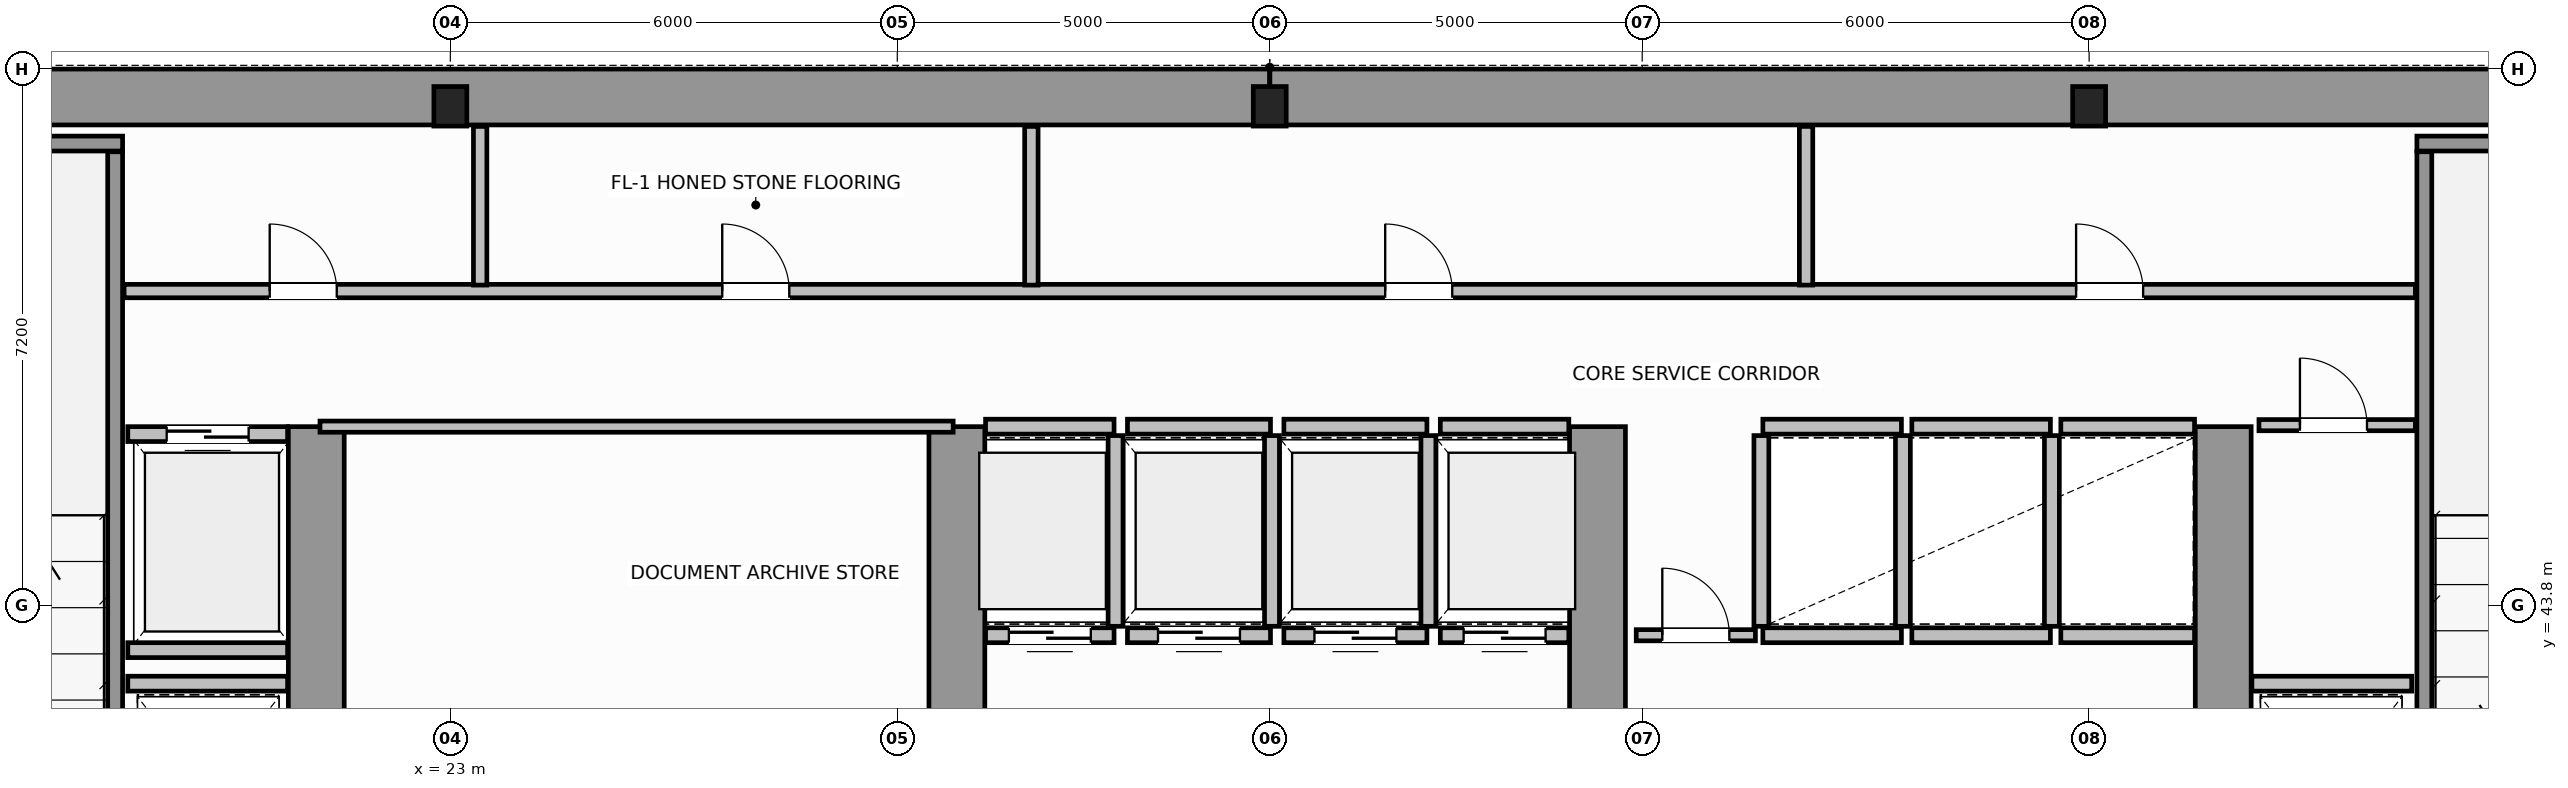
"""IFC4 building model, lengths in metres.
Left out: names, types, materials, properties, quantities, classifications, styles, units other than length and angle.
Written with IfcOpenShell. Run it as: python <this file> out.ifc"""

import sys

from ifc_helpers import new_model, si_unit, direction, frame, frame_2d, origin, origin_2d, place, context, subcontext, project, spatial, rectangle, i_section, extrude, source, transform, mapped, element, fill, save


model = new_model("IFC4")
c1 = context("Model", 3, precision=1e-05, world=origin(), true_north=direction((0.0, 1.0)))
c2 = subcontext(c1, "Body", "Model", "MODEL_VIEW")
j1 = project(units=[si_unit("LENGTHUNIT", "METRE"), si_unit("PLANEANGLEUNIT", "RADIAN")], contexts=[c1])
p1 = place(None, origin())
s1 = spatial("IfcSite", under=j1, at=p1, CompositionType="ELEMENT")
p2 = place(p1, origin())
s2 = spatial("IfcBuilding", under=s1, at=p2, CompositionType="ELEMENT")
p3 = place(p2, frame((0.0, 0.0, 114.8)))
s3 = spatial("IfcBuildingStorey", under=s2, at=p3, CompositionType="ELEMENT", Elevation=114.8)
m1 = source(origin(), c2, "Body", "SweptSolid", [
    extrude(i_section(OverallWidth=0.442, OverallDepth=0.531, WebThickness=0.065, FlangeThickness=0.076, FilletRadius=0.015, at=origin_2d()), origin(), (0.0, 0.0, 1.0), 3.8),
])
for number, where, z_axis, x_axis in (
    (1, (23.0, 50.5, 0.0), (0.0, 0.0, 1.0), (1.0, 0.0, 0.0)),
    (2, (34.0, 50.5, 0.0), (0.0, 0.0, 1.0), (1.0, 0.0, 0.0)),
    (3, (45.0, 50.5, 0.0), (0.0, 0.0, 1.0), (1.0, 0.0, 0.0)),
):
    element("IfcColumn", number, at=place(p3, frame(where, z_axis=z_axis, x_axis=x_axis)), inside=s3, PredefinedType="COLUMN", context=c2, shape_type="MappedRepresentation", body=[
        mapped(m1, transform((0.0, 0.0, 0.0), scale=1.0)),
    ])
for number, where, z_axis, x_axis in (
    (4, (14.379, 50.625, 0.0), (0.0, 0.0, 1.0), (1.0, 0.0, 0.0)),
    (5, (34.002, 50.625, 0.0), (0.0, 0.0, 1.0), (1.0, 0.0, 0.0)),
):
    element("IfcWall", number, at=place(p3, frame(where, z_axis=z_axis, x_axis=x_axis)), inside=s3, PredefinedType="SHEAR", context=c2, shape_type="SweptSolid", body=[
        extrude(rectangle(XDim=19.619, YDim=0.75, at=frame_2d((9.81, 0.0))), origin(), (0.0, 0.0, 1.0), 3.8),
    ])
for number, where, z_axis, x_axis in (
    (6, (21.2, 36.895, 0.0), (0.0, 0.0, 1.0), (0.0, 1.0, 0.0)),
    (7, (29.8, 36.895, 0.0), (0.0, 0.0, 1.0), (0.0, 1.0, 0.0)),
    (8, (38.4, 36.895, 0.0), (0.0, 0.0, 1.0), (0.0, 1.0, 0.0)),
    (9, (46.8, 36.895, 0.0), (0.0, 0.0, 1.0), (0.0, 1.0, 0.0)),
):
    element("IfcWall", number, at=place(p3, frame(where, z_axis=z_axis, x_axis=x_axis)), inside=s3, PredefinedType="SHEAR", context=c2, shape_type="SweptSolid", body=[
        extrude(rectangle(XDim=9.305, YDim=0.75, at=frame_2d((4.652, 0.0))), origin(), (0.0, 0.0, 1.0), 3.8),
    ])
p4 = place(p3, frame((14.375, 50.0, 0.0), z_axis=(0.0, 0.0, 1.0), x_axis=(1.0, 0.0, 0.0)))
e10 = element("IfcWall", 10, at=p4, inside=s3, PredefinedType="SOLIDWALL", context=c2, shape_type="SweptSolid", body=[
    extrude(rectangle(XDim=4.225, YDim=0.2, at=frame_2d((2.113, 0.0))), origin(), (0.0, 0.0, 1.0), 3.8),
])
p5 = place(p3, frame((18.5, 39.96, 0.0), z_axis=(0.0, 0.0, 1.0), x_axis=(0.0, 1.0, 0.0)))
e11 = element("IfcWall", 11, at=p5, inside=s3, PredefinedType="SOLIDWALL", context=c2, shape_type="SweptSolid", body=[
    extrude(rectangle(XDim=9.93, YDim=0.2, at=frame_2d((4.965, 0.0))), origin(), (0.0, 0.0, 1.0), 3.8),
])
p6 = place(p3, frame((49.4, 50.0, 0.0), z_axis=(0.0, 0.0, 1.0), x_axis=(1.0, 0.0, 0.0)))
e12 = element("IfcWall", 12, at=p6, inside=s3, PredefinedType="SOLIDWALL", context=c2, shape_type="SweptSolid", body=[
    extrude(rectangle(XDim=4.225, YDim=0.2, at=frame_2d((2.113, 0.0))), origin(), (0.0, 0.0, 1.0), 3.8),
])
p7 = place(p3, frame((49.5, 39.96, 0.0), z_axis=(0.0, 0.0, 1.0), x_axis=(0.0, 1.0, 0.0)))
e13 = element("IfcWall", 13, at=p7, inside=s3, PredefinedType="SOLIDWALL", context=c2, shape_type="SweptSolid", body=[
    extrude(rectangle(XDim=9.93, YDim=0.2, at=frame_2d((4.965, 0.0))), origin(), (0.0, 0.0, 1.0), 3.8),
])
p8 = place(p3, frame((30.185, 43.4, 0.0), z_axis=(0.0, 0.0, 1.0), x_axis=(1.0, 0.0, 0.0)))
e14 = element("IfcWall", 14, at=p8, inside=s3, PredefinedType="SOLIDWALL", context=c2, shape_type="SweptSolid", body=[
    extrude(rectangle(XDim=1.725, YDim=0.2, at=frame_2d((0.862, 0.0))), origin(), (0.0, 0.0, 1.0), 3.58),
])
p9 = place(p8, frame((0.313, 0.0, 0.0)))
e15 = element("IfcOpeningElement", 15, at=p9, cuts=e14, PredefinedType="OPENING", context=c2, shape_type="SweptSolid", body=[
    extrude(rectangle(XDim=1.1, YDim=2.15, at=frame_2d((0.55, 1.075))), frame((0.0, 0.11, 0.0), z_axis=(0.0, -1.0, 0.0), x_axis=(1.0, 0.0, 0.0)), (0.0, 0.0, 1.0), 0.22),
])
p10 = place(p3, frame((30.185, 46.2, 0.0), z_axis=(0.0, 0.0, 1.0), x_axis=(1.0, 0.0, 0.0)))
e16 = element("IfcWall", 16, at=p10, inside=s3, PredefinedType="SOLIDWALL", context=c2, shape_type="SweptSolid", body=[
    extrude(rectangle(XDim=1.725, YDim=0.2, at=frame_2d((0.862, 0.0))), origin(), (0.0, 0.0, 1.0), 3.58),
])
p11 = place(p3, frame((31.93, 43.52, 0.0), z_axis=(0.0, 0.0, 1.0), x_axis=(0.0, 1.0, 0.0)))
e17 = element("IfcWall", 17, at=p11, inside=s3, PredefinedType="SOLIDWALL", context=c2, shape_type="SweptSolid", body=[
    extrude(rectangle(XDim=2.56, YDim=0.2, at=frame_2d((1.28, 0.0))), origin(), (0.0, 0.0, 1.0), 3.58),
])
p12 = place(p3, frame((32.09, 43.4, 0.0), z_axis=(0.0, 0.0, 1.0), x_axis=(1.0, 0.0, 0.0)))
e18 = element("IfcWall", 18, at=p12, inside=s3, PredefinedType="SOLIDWALL", context=c2, shape_type="SweptSolid", body=[
    extrude(rectangle(XDim=1.92, YDim=0.2, at=frame_2d((0.96, 0.0))), origin(), (0.0, 0.0, 1.0), 3.58),
])
p13 = place(p12, frame((0.41, 0.0, 0.0)))
e19 = element("IfcOpeningElement", 19, at=p13, cuts=e18, PredefinedType="OPENING", context=c2, shape_type="SweptSolid", body=[
    extrude(rectangle(XDim=1.1, YDim=2.15, at=frame_2d((0.55, 1.075))), frame((0.0, 0.11, 0.0), z_axis=(0.0, -1.0, 0.0), x_axis=(1.0, 0.0, 0.0)), (0.0, 0.0, 1.0), 0.22),
])
p14 = place(p3, frame((32.09, 46.2, 0.0), z_axis=(0.0, 0.0, 1.0), x_axis=(1.0, 0.0, 0.0)))
e20 = element("IfcWall", 20, at=p14, inside=s3, PredefinedType="SOLIDWALL", context=c2, shape_type="SweptSolid", body=[
    extrude(rectangle(XDim=1.92, YDim=0.2, at=frame_2d((0.96, 0.0))), origin(), (0.0, 0.0, 1.0), 3.58),
])
p15 = place(p3, frame((34.03, 43.52, 0.0), z_axis=(0.0, 0.0, 1.0), x_axis=(0.0, 1.0, 0.0)))
e21 = element("IfcWall", 21, at=p15, inside=s3, PredefinedType="SOLIDWALL", context=c2, shape_type="SweptSolid", body=[
    extrude(rectangle(XDim=2.56, YDim=0.2, at=frame_2d((1.28, 0.0))), origin(), (0.0, 0.0, 1.0), 3.58),
])
p16 = place(p3, frame((34.19, 43.4, 0.0), z_axis=(0.0, 0.0, 1.0), x_axis=(1.0, 0.0, 0.0)))
e22 = element("IfcWall", 22, at=p16, inside=s3, PredefinedType="SOLIDWALL", context=c2, shape_type="SweptSolid", body=[
    extrude(rectangle(XDim=1.92, YDim=0.2, at=frame_2d((0.96, 0.0))), origin(), (0.0, 0.0, 1.0), 3.58),
])
p17 = place(p16, frame((0.41, 0.0, 0.0)))
e23 = element("IfcOpeningElement", 23, at=p17, cuts=e22, PredefinedType="OPENING", context=c2, shape_type="SweptSolid", body=[
    extrude(rectangle(XDim=1.1, YDim=2.15, at=frame_2d((0.55, 1.075))), frame((0.0, 0.11, 0.0), z_axis=(0.0, -1.0, 0.0), x_axis=(1.0, 0.0, 0.0)), (0.0, 0.0, 1.0), 0.22),
])
p18 = place(p3, frame((34.19, 46.2, 0.0), z_axis=(0.0, 0.0, 1.0), x_axis=(1.0, 0.0, 0.0)))
e24 = element("IfcWall", 24, at=p18, inside=s3, PredefinedType="SOLIDWALL", context=c2, shape_type="SweptSolid", body=[
    extrude(rectangle(XDim=1.92, YDim=0.2, at=frame_2d((0.96, 0.0))), origin(), (0.0, 0.0, 1.0), 3.58),
])
p19 = place(p3, frame((36.13, 43.52, 0.0), z_axis=(0.0, 0.0, 1.0), x_axis=(0.0, 1.0, 0.0)))
e25 = element("IfcWall", 25, at=p19, inside=s3, PredefinedType="SOLIDWALL", context=c2, shape_type="SweptSolid", body=[
    extrude(rectangle(XDim=2.56, YDim=0.2, at=frame_2d((1.28, 0.0))), origin(), (0.0, 0.0, 1.0), 3.58),
])
p20 = place(p3, frame((36.29, 43.4, 0.0), z_axis=(0.0, 0.0, 1.0), x_axis=(1.0, 0.0, 0.0)))
e26 = element("IfcWall", 26, at=p20, inside=s3, PredefinedType="SOLIDWALL", context=c2, shape_type="SweptSolid", body=[
    extrude(rectangle(XDim=1.725, YDim=0.2, at=frame_2d((0.862, 0.0))), origin(), (0.0, 0.0, 1.0), 3.58),
])
p21 = place(p20, frame((0.313, 0.0, 0.0)))
e27 = element("IfcOpeningElement", 27, at=p21, cuts=e26, PredefinedType="OPENING", context=c2, shape_type="SweptSolid", body=[
    extrude(rectangle(XDim=1.1, YDim=2.15, at=frame_2d((0.55, 1.075))), frame((0.0, 0.11, 0.0), z_axis=(0.0, -1.0, 0.0), x_axis=(1.0, 0.0, 0.0)), (0.0, 0.0, 1.0), 0.22),
])
p22 = place(p3, frame((36.29, 46.2, 0.0), z_axis=(0.0, 0.0, 1.0), x_axis=(1.0, 0.0, 0.0)))
e28 = element("IfcWall", 28, at=p22, inside=s3, PredefinedType="SOLIDWALL", context=c2, shape_type="SweptSolid", body=[
    extrude(rectangle(XDim=1.725, YDim=0.2, at=frame_2d((0.862, 0.0))), origin(), (0.0, 0.0, 1.0), 3.58),
])
for number, where, z_axis, x_axis in (
    (29, (40.62, 43.4, 0.0), (0.0, 0.0, 1.0), (1.0, 0.0, 0.0)),
    (30, (40.62, 46.2, 0.0), (0.0, 0.0, 1.0), (1.0, 0.0, 0.0)),
):
    element("IfcWall", number, at=place(p3, frame(where, z_axis=z_axis, x_axis=x_axis)), inside=s3, PredefinedType="SOLIDWALL", context=c2, shape_type="SweptSolid", body=[
        extrude(rectangle(XDim=1.86, YDim=0.2, at=frame_2d((0.93, 0.0))), origin(), (0.0, 0.0, 1.0), 3.58),
    ])
for number, where, z_axis, x_axis in (
    (31, (40.6, 43.52, 0.0), (0.0, 0.0, 1.0), (0.0, 1.0, 0.0)),
    (32, (42.5, 43.52, 0.0), (0.0, 0.0, 1.0), (0.0, 1.0, 0.0)),
):
    element("IfcWall", number, at=place(p3, frame(where, z_axis=z_axis, x_axis=x_axis)), inside=s3, PredefinedType="SOLIDWALL", context=c2, shape_type="SweptSolid", body=[
        extrude(rectangle(XDim=2.56, YDim=0.2, at=frame_2d((1.28, 0.0))), origin(), (0.0, 0.0, 1.0), 3.58),
    ])
for number, where, z_axis, x_axis in (
    (33, (42.62, 43.4, 0.0), (0.0, 0.0, 1.0), (1.0, 0.0, 0.0)),
    (34, (42.62, 46.2, 0.0), (0.0, 0.0, 1.0), (1.0, 0.0, 0.0)),
):
    element("IfcWall", number, at=place(p3, frame(where, z_axis=z_axis, x_axis=x_axis)), inside=s3, PredefinedType="SOLIDWALL", context=c2, shape_type="SweptSolid", body=[
        extrude(rectangle(XDim=1.86, YDim=0.2, at=frame_2d((0.93, 0.0))), origin(), (0.0, 0.0, 1.0), 3.58),
    ])
p23 = place(p3, frame((44.5, 43.52, 0.0), z_axis=(0.0, 0.0, 1.0), x_axis=(0.0, 1.0, 0.0)))
e35 = element("IfcWall", 35, at=p23, inside=s3, PredefinedType="SOLIDWALL", context=c2, shape_type="SweptSolid", body=[
    extrude(rectangle(XDim=2.56, YDim=0.2, at=frame_2d((1.28, 0.0))), origin(), (0.0, 0.0, 1.0), 3.58),
])
for number, where, z_axis, x_axis in (
    (36, (44.62, 43.4, 0.0), (0.0, 0.0, 1.0), (1.0, 0.0, 0.0)),
    (37, (44.62, 46.2, 0.0), (0.0, 0.0, 1.0), (1.0, 0.0, 0.0)),
):
    element("IfcWall", number, at=place(p3, frame(where, z_axis=z_axis, x_axis=x_axis)), inside=s3, PredefinedType="SOLIDWALL", context=c2, shape_type="SweptSolid", body=[
        extrude(rectangle(XDim=1.795, YDim=0.2, at=frame_2d((0.897, 0.0))), origin(), (0.0, 0.0, 1.0), 3.58),
    ])
p24 = place(p3, frame((18.67, 46.1, 0.0), z_axis=(0.0, 0.0, 1.0), x_axis=(1.0, 0.0, 0.0)))
e38 = element("IfcWall", 38, at=p24, inside=s3, PredefinedType="SOLIDWALL", context=c2, shape_type="SweptSolid", body=[
    extrude(rectangle(XDim=2.145, YDim=0.2, at=frame_2d((1.073, 0.0))), origin(), (0.0, 0.0, 1.0), 3.58),
])
p25 = place(p24, frame((0.522, 0.0, 0.0)))
e39 = element("IfcOpeningElement", 39, at=p25, cuts=e38, PredefinedType="OPENING", context=c2, shape_type="SweptSolid", body=[
    extrude(rectangle(XDim=1.1, YDim=2.15, at=frame_2d((0.55, 1.075))), frame((0.0, 0.11, 0.0), z_axis=(0.0, -1.0, 0.0), x_axis=(1.0, 0.0, 0.0)), (0.0, 0.0, 1.0), 0.22),
])
for number, where, z_axis, x_axis in (
    (40, (18.67, 43.2, 0.0), (0.0, 0.0, 1.0), (1.0, 0.0, 0.0)),
    (41, (18.67, 42.75, 0.0), (0.0, 0.0, 1.0), (1.0, 0.0, 0.0)),
    (42, (47.185, 42.75, 0.0), (0.0, 0.0, 1.0), (1.0, 0.0, 0.0)),
):
    element("IfcWall", number, at=place(p3, frame(where, z_axis=z_axis, x_axis=x_axis)), inside=s3, PredefinedType="SOLIDWALL", context=c2, shape_type="SweptSolid", body=[
        extrude(rectangle(XDim=2.145, YDim=0.2, at=frame_2d((1.073, 0.0))), origin(), (0.0, 0.0, 1.0), 3.58),
    ])
p26 = place(p3, frame((21.25, 46.2, 0.0), z_axis=(0.0, 0.0, 1.0), x_axis=(1.0, 0.0, 0.0)))
e43 = element("IfcWall", 43, at=p26, inside=s3, PredefinedType="PARTITIONING", context=c2, shape_type="SweptSolid", body=[
    extrude(rectangle(XDim=8.5, YDim=0.15, at=frame_2d((4.25, 0.0))), origin(), (0.0, 0.0, 1.0), 3.58),
])
p27 = place(p3, frame((47.28, 46.22, 0.0), z_axis=(0.0, 0.0, 1.0), x_axis=(1.0, 0.0, 0.0)))
e44 = element("IfcWall", 44, at=p27, inside=s3, PredefinedType="PARTITIONING", context=c2, shape_type="SweptSolid", body=[
    extrude(rectangle(XDim=2.1, YDim=0.15, at=frame_2d((1.05, 0.0))), origin(), (0.0, 0.0, 1.0), 3.58),
])
p28 = place(p27, frame((0.55, 0.0, 0.0)))
e45 = element("IfcOpeningElement", 45, at=p28, cuts=e44, PredefinedType="OPENING", context=c2, shape_type="SweptSolid", body=[
    extrude(rectangle(XDim=0.9, YDim=2.1, at=frame_2d((0.45, 1.05))), frame((0.0, 0.085, 0.0), z_axis=(0.0, -1.0, 0.0), x_axis=(1.0, 0.0, 0.0)), (0.0, 0.0, 1.0), 0.17),
])
p29 = place(p3, frame((38.92, 43.4, 0.0), z_axis=(0.0, 0.0, 1.0), x_axis=(1.0, 0.0, 0.0)))
e46 = element("IfcWall", 46, at=p29, inside=s3, PredefinedType="PARTITIONING", context=c2, shape_type="SweptSolid", body=[
    extrude(rectangle(XDim=1.6, YDim=0.15, at=frame_2d((0.8, 0.0))), origin(), (0.0, 0.0, 1.0), 3.58),
])
p30 = place(p29, frame((0.35, 0.0, 0.0)))
e47 = element("IfcOpeningElement", 47, at=p30, cuts=e46, PredefinedType="OPENING", context=c2, shape_type="SweptSolid", body=[
    extrude(rectangle(XDim=0.9, YDim=2.1, at=frame_2d((0.45, 1.05))), frame((0.0, 0.085, 0.0), z_axis=(0.0, -1.0, 0.0), x_axis=(1.0, 0.0, 0.0)), (0.0, 0.0, 1.0), 0.17),
])
p31 = place(p3, frame((18.62, 48.02, 0.0), z_axis=(0.0, 0.0, 1.0), x_axis=(1.0, 0.0, 0.0)))
e48 = element("IfcWall", 48, at=p31, inside=s3, PredefinedType="PLUMBINGWALL", context=c2, shape_type="SweptSolid", body=[
    extrude(rectangle(XDim=30.76, YDim=0.18, at=frame_2d((15.38, 0.0))), origin(), (0.0, 0.0, 1.0), 3.58),
])
p32 = place(p31, frame((1.955, 0.0, 0.0)))
e49 = element("IfcOpeningElement", 49, at=p32, cuts=e48, PredefinedType="OPENING", context=c2, shape_type="SweptSolid", body=[
    extrude(rectangle(XDim=0.9, YDim=2.15, at=frame_2d((0.45, 1.075))), frame((0.0, 0.1, 0.0), z_axis=(0.0, -1.0, 0.0), x_axis=(1.0, 0.0, 0.0)), (0.0, 0.0, 1.0), 0.2),
])
p33 = place(p31, frame((8.03, 0.0, 0.0)))
e50 = element("IfcOpeningElement", 50, at=p33, cuts=e48, PredefinedType="OPENING", context=c2, shape_type="SweptSolid", body=[
    extrude(rectangle(XDim=0.9, YDim=2.15, at=frame_2d((0.45, 1.075))), frame((0.0, 0.1, 0.0), z_axis=(0.0, -1.0, 0.0), x_axis=(1.0, 0.0, 0.0)), (0.0, 0.0, 1.0), 0.2),
])
p34 = place(p31, frame((16.93, 0.0, 0.0)))
e51 = element("IfcOpeningElement", 51, at=p34, cuts=e48, PredefinedType="OPENING", context=c2, shape_type="SweptSolid", body=[
    extrude(rectangle(XDim=0.9, YDim=2.15, at=frame_2d((0.45, 1.075))), frame((0.0, 0.1, 0.0), z_axis=(0.0, -1.0, 0.0), x_axis=(1.0, 0.0, 0.0)), (0.0, 0.0, 1.0), 0.2),
])
p35 = place(p31, frame((26.205, 0.0, 0.0)))
e52 = element("IfcOpeningElement", 52, at=p35, cuts=e48, PredefinedType="OPENING", context=c2, shape_type="SweptSolid", body=[
    extrude(rectangle(XDim=0.9, YDim=2.15, at=frame_2d((0.45, 1.075))), frame((0.0, 0.1, 0.0), z_axis=(0.0, -1.0, 0.0), x_axis=(1.0, 0.0, 0.0)), (0.0, 0.0, 1.0), 0.2),
])
for number, where, z_axis, x_axis in (
    (53, (23.4, 48.1, 0.0), (0.0, 0.0, 1.0), (0.0, 1.0, 0.0)),
    (54, (30.8, 48.1, 0.0), (0.0, 0.0, 1.0), (0.0, 1.0, 0.0)),
    (55, (41.2, 48.1, 0.0), (0.0, 0.0, 1.0), (0.0, 1.0, 0.0)),
):
    element("IfcWall", number, at=place(p3, frame(where, z_axis=z_axis, x_axis=x_axis)), inside=s3, PredefinedType="PLUMBINGWALL", context=c2, shape_type="SweptSolid", body=[
        extrude(rectangle(XDim=2.13, YDim=0.18, at=frame_2d((1.065, 0.0))), origin(), (0.0, 0.0, 1.0), 3.58),
    ])
m2 = source(origin(), c2, "Body", "SweptSolid", [
    extrude(rectangle(XDim=1.1, YDim=2.15, at=frame_2d((0.55, 1.075))), frame((0.0, 0.025, 0.0), z_axis=(0.0, -1.0, 0.0), x_axis=(1.0, 0.0, 0.0)), (0.0, 0.0, 1.0), 0.05),
])
p36 = place(p9, origin())
e56 = element("IfcDoor", 56, at=p36, inside=s3, OperationType="DOUBLE_DOOR_SLIDING", PredefinedType="DOOR", context=c2, shape_type="MappedRepresentation", body=[
    mapped(m2, transform((0.0, 0.0, 0.0), scale=1.0)),
])
fill(e15, e56)
p37 = place(p13, origin())
e57 = element("IfcDoor", 57, at=p37, inside=s3, OperationType="DOUBLE_DOOR_SLIDING", PredefinedType="DOOR", context=c2, shape_type="MappedRepresentation", body=[
    mapped(m2, transform((0.0, 0.0, 0.0), scale=1.0)),
])
fill(e19, e57)
p38 = place(p17, origin())
e58 = element("IfcDoor", 58, at=p38, inside=s3, OperationType="DOUBLE_DOOR_SLIDING", PredefinedType="DOOR", context=c2, shape_type="MappedRepresentation", body=[
    mapped(m2, transform((0.0, 0.0, 0.0), scale=1.0)),
])
fill(e23, e58)
p39 = place(p21, origin())
e59 = element("IfcDoor", 59, at=p39, inside=s3, OperationType="DOUBLE_DOOR_SLIDING", PredefinedType="DOOR", context=c2, shape_type="MappedRepresentation", body=[
    mapped(m2, transform((0.0, 0.0, 0.0), scale=1.0)),
])
fill(e27, e59)
p40 = place(p25, origin())
e60 = element("IfcDoor", 60, at=p40, inside=s3, OperationType="DOUBLE_DOOR_SLIDING", PredefinedType="DOOR", context=c2, shape_type="MappedRepresentation", body=[
    mapped(m2, transform((0.0, 0.0, 0.0), scale=1.0)),
])
fill(e39, e60)
m3 = source(origin(), c2, "Body", "SweptSolid", [
    extrude(rectangle(XDim=0.9, YDim=2.1, at=frame_2d((0.45, 1.05))), frame((0.0, 0.025, 0.0), z_axis=(0.0, -1.0, 0.0), x_axis=(1.0, 0.0, 0.0)), (0.0, 0.0, 1.0), 0.05),
])
p41 = place(p28, origin())
e61 = element("IfcDoor", 61, at=p41, inside=s3, OperationType="SINGLE_SWING_RIGHT", PredefinedType="DOOR", context=c2, shape_type="MappedRepresentation", body=[
    mapped(m3, transform((0.0, 0.0, 0.0), scale=1.0)),
])
fill(e45, e61)
p42 = place(p30, origin())
e62 = element("IfcDoor", 62, at=p42, inside=s3, OperationType="SINGLE_SWING_LEFT", PredefinedType="DOOR", context=c2, shape_type="MappedRepresentation", body=[
    mapped(m3, transform((0.0, 0.0, 0.0), scale=1.0)),
])
fill(e47, e62)
m4 = source(origin(), c2, "Body", "SweptSolid", [
    extrude(rectangle(XDim=0.9, YDim=2.15, at=frame_2d((0.45, 1.075))), frame((0.0, 0.025, 0.0), z_axis=(0.0, -1.0, 0.0), x_axis=(1.0, 0.0, 0.0)), (0.0, 0.0, 1.0), 0.05),
])
p43 = place(p32, origin())
e63 = element("IfcDoor", 63, at=p43, inside=s3, OperationType="SINGLE_SWING_LEFT", PredefinedType="DOOR", context=c2, shape_type="MappedRepresentation", body=[
    mapped(m4, transform((0.0, 0.0, 0.0), scale=1.0)),
])
fill(e49, e63)
p44 = place(p33, origin())
e64 = element("IfcDoor", 64, at=p44, inside=s3, OperationType="SINGLE_SWING_RIGHT", PredefinedType="DOOR", context=c2, shape_type="MappedRepresentation", body=[
    mapped(m4, transform((0.0, 0.0, 0.0), scale=1.0)),
])
fill(e50, e64)
p45 = place(p34, origin())
e65 = element("IfcDoor", 65, at=p45, inside=s3, OperationType="SINGLE_SWING_LEFT", PredefinedType="DOOR", context=c2, shape_type="MappedRepresentation", body=[
    mapped(m4, transform((0.0, 0.0, 0.0), scale=1.0)),
])
fill(e51, e65)
p46 = place(p35, origin())
e66 = element("IfcDoor", 66, at=p46, inside=s3, OperationType="SINGLE_SWING_RIGHT", PredefinedType="DOOR", context=c2, shape_type="MappedRepresentation", body=[
    mapped(m4, transform((0.0, 0.0, 0.0), scale=1.0)),
])
fill(e52, e66)
save(model, sys.argv[1])
